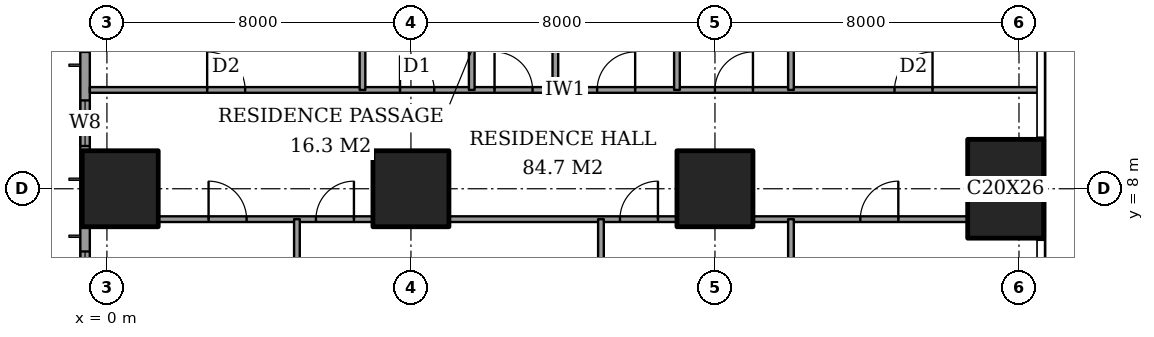
"""IFC4 building model, lengths in metres.
Left out: names, types, materials, properties, quantities, classifications, styles, units other than length and angle.
Written with IfcOpenShell. Run it as: python <this file> out.ifc"""

import sys

from ifc_helpers import new_model, si_unit, direction, frame, frame_2d, origin, origin_2d, place, context, subcontext, project, spatial, rectangle, extrude, element, fill, save


model = new_model("IFC4")
c1 = context("Model", 3, precision=1e-05, world=origin(), true_north=direction((0.0, 1.0)))
c2 = subcontext(c1, "Body", "Model", "MODEL_VIEW")
j1 = project(units=[si_unit("LENGTHUNIT", "METRE"), si_unit("PLANEANGLEUNIT", "RADIAN")], contexts=[c1])
p1 = place(None, origin())
s1 = spatial("IfcSite", under=j1, at=p1, CompositionType="ELEMENT")
p2 = place(p1, origin())
s2 = spatial("IfcBuilding", under=s1, at=p2, CompositionType="ELEMENT")
p3 = place(p2, frame((0.0, 0.0, 58.4)))
s3 = spatial("IfcBuildingStorey", under=s2, at=p3, CompositionType="ELEMENT", Elevation=58.4)
for number, where, z_axis, x_axis in (
    (1, (0.35, 8.0, 0.0), (0.0, 0.0, 1.0), (1.0, 0.0, 0.0)),
    (2, (8.0, 8.0, 0.0), (0.0, 0.0, 1.0), (1.0, 0.0, 0.0)),
    (3, (16.0, 8.0, 0.0), (0.0, 0.0, 1.0), (1.0, 0.0, 0.0)),
):
    element("IfcColumn", number, at=place(p3, frame(where, z_axis=z_axis, x_axis=x_axis)), inside=s3, PredefinedType="COLUMN", context=c2, shape_type="SweptSolid", body=[
        extrude(rectangle(XDim=2.0, YDim=2.0, at=origin_2d()), origin(), (0.0, 0.0, 1.0), 3.6),
    ])
p4 = place(p3, frame((23.65, 8.0, 0.0), z_axis=(0.0, 0.0, 1.0), x_axis=(1.0, 0.0, 0.0)))
e4 = element("IfcColumn", 4, at=p4, inside=s3, PredefinedType="COLUMN", context=c2, shape_type="SweptSolid", body=[
    extrude(rectangle(XDim=2.0, YDim=2.6, at=origin_2d()), origin(), (0.0, 0.0, 1.0), 3.6),
])
p5 = place(p3, frame((-0.575, 44.825, 0.0), z_axis=(0.0, 0.0, 1.0), x_axis=(0.0, -1.0, 0.0)))
e5 = element("IfcWall", 5, at=p5, inside=s3, PredefinedType="SOLIDWALL", context=c2, shape_type="SweptSolid", body=[
    extrude(rectangle(XDim=41.65, YDim=0.25, at=frame_2d((20.825, 0.0))), origin(), (0.0, 0.0, 1.0), 3.6),
])
p6 = place(p5, frame((0.775, 0.0, 0.6)))
e6 = element("IfcOpeningElement", 6, at=p6, cuts=e5, PredefinedType="OPENING", context=c2, shape_type="SweptSolid", body=[
    extrude(rectangle(XDim=2.4, YDim=2.0, at=frame_2d((1.2, 1.0))), frame((0.0, 0.135, 0.0), z_axis=(0.0, -1.0, 0.0), x_axis=(1.0, 0.0, 0.0)), (0.0, 0.0, 1.0), 0.27),
])
p7 = place(p5, frame((6.1, 0.0, 0.6)))
e7 = element("IfcOpeningElement", 7, at=p7, cuts=e5, PredefinedType="OPENING", context=c2, shape_type="SweptSolid", body=[
    extrude(rectangle(XDim=1.2, YDim=2.0, at=frame_2d((0.6, 1.0))), frame((0.0, 0.135, 0.0), z_axis=(0.0, -1.0, 0.0), x_axis=(1.0, 0.0, 0.0)), (0.0, 0.0, 1.0), 0.27),
])
p8 = place(p5, frame((8.425, 0.0, 0.6)))
e8 = element("IfcOpeningElement", 8, at=p8, cuts=e5, PredefinedType="OPENING", context=c2, shape_type="SweptSolid", body=[
    extrude(rectangle(XDim=2.4, YDim=2.0, at=frame_2d((1.2, 1.0))), frame((0.0, 0.135, 0.0), z_axis=(0.0, -1.0, 0.0), x_axis=(1.0, 0.0, 0.0)), (0.0, 0.0, 1.0), 0.27),
])
p9 = place(p5, frame((15.625, 0.0, 0.6)))
e9 = element("IfcOpeningElement", 9, at=p9, cuts=e5, PredefinedType="OPENING", context=c2, shape_type="SweptSolid", body=[
    extrude(rectangle(XDim=2.4, YDim=2.0, at=frame_2d((1.2, 1.0))), frame((0.0, 0.135, 0.0), z_axis=(0.0, -1.0, 0.0), x_axis=(1.0, 0.0, 0.0)), (0.0, 0.0, 1.0), 0.27),
])
p10 = place(p5, frame((23.625, 0.0, 0.6)))
e10 = element("IfcOpeningElement", 10, at=p10, cuts=e5, PredefinedType="OPENING", context=c2, shape_type="SweptSolid", body=[
    extrude(rectangle(XDim=2.4, YDim=2.0, at=frame_2d((1.2, 1.0))), frame((0.0, 0.135, 0.0), z_axis=(0.0, -1.0, 0.0), x_axis=(1.0, 0.0, 0.0)), (0.0, 0.0, 1.0), 0.27),
])
p11 = place(p5, frame((30.825, 0.0, 0.6)))
e11 = element("IfcOpeningElement", 11, at=p11, cuts=e5, PredefinedType="OPENING", context=c2, shape_type="SweptSolid", body=[
    extrude(rectangle(XDim=2.4, YDim=2.0, at=frame_2d((1.2, 1.0))), frame((0.0, 0.135, 0.0), z_axis=(0.0, -1.0, 0.0), x_axis=(1.0, 0.0, 0.0)), (0.0, 0.0, 1.0), 0.27),
])
p12 = place(p5, frame((34.5, 0.0, 0.6)))
e12 = element("IfcOpeningElement", 12, at=p12, cuts=e5, PredefinedType="OPENING", context=c2, shape_type="SweptSolid", body=[
    extrude(rectangle(XDim=1.2, YDim=2.0, at=frame_2d((0.6, 1.0))), frame((0.0, 0.135, 0.0), z_axis=(0.0, -1.0, 0.0), x_axis=(1.0, 0.0, 0.0)), (0.0, 0.0, 1.0), 0.27),
])
p13 = place(p5, frame((38.475, 0.0, 0.6)))
e13 = element("IfcOpeningElement", 13, at=p13, cuts=e5, PredefinedType="OPENING", context=c2, shape_type="SweptSolid", body=[
    extrude(rectangle(XDim=2.4, YDim=2.0, at=frame_2d((1.2, 1.0))), frame((0.0, 0.135, 0.0), z_axis=(0.0, -1.0, 0.0), x_axis=(1.0, 0.0, 0.0)), (0.0, 0.0, 1.0), 0.27),
])
p14 = place(p3, frame((1.35, 7.2, 0.0), z_axis=(0.0, 0.0, 1.0), x_axis=(1.0, 0.0, 0.0)))
e14 = element("IfcWall", 14, at=p14, inside=s3, PredefinedType="PARTITIONING", context=c2, shape_type="SweptSolid", body=[
    extrude(rectangle(XDim=5.65, YDim=0.15, at=frame_2d((2.825, 0.0))), origin(), (0.0, 0.0, 1.0), 3.35),
])
p15 = place(p14, frame((1.325, 0.0, 0.0)))
e15 = element("IfcOpeningElement", 15, at=p15, cuts=e14, PredefinedType="OPENING", context=c2, shape_type="SweptSolid", body=[
    extrude(rectangle(XDim=1.0, YDim=2.1, at=frame_2d((0.5, 1.05))), frame((0.0, 0.085, 0.0), z_axis=(0.0, -1.0, 0.0), x_axis=(1.0, 0.0, 0.0)), (0.0, 0.0, 1.0), 0.17),
])
p16 = place(p14, frame((4.15, 0.0, 0.0)))
e16 = element("IfcOpeningElement", 16, at=p16, cuts=e14, PredefinedType="OPENING", context=c2, shape_type="SweptSolid", body=[
    extrude(rectangle(XDim=1.0, YDim=2.1, at=frame_2d((0.5, 1.05))), frame((0.0, 0.085, 0.0), z_axis=(0.0, -1.0, 0.0), x_axis=(1.0, 0.0, 0.0)), (0.0, 0.0, 1.0), 0.17),
])
p17 = place(p3, frame((9.0, 7.2, 0.0), z_axis=(0.0, 0.0, 1.0), x_axis=(1.0, 0.0, 0.0)))
e17 = element("IfcWall", 17, at=p17, inside=s3, PredefinedType="PARTITIONING", context=c2, shape_type="SweptSolid", body=[
    extrude(rectangle(XDim=6.0, YDim=0.15, at=frame_2d((3.0, 0.0))), origin(), (0.0, 0.0, 1.0), 3.35),
])
p18 = place(p17, frame((4.5, 0.0, 0.0)))
e18 = element("IfcOpeningElement", 18, at=p18, cuts=e17, PredefinedType="OPENING", context=c2, shape_type="SweptSolid", body=[
    extrude(rectangle(XDim=1.0, YDim=2.1, at=frame_2d((0.5, 1.05))), frame((0.0, 0.085, 0.0), z_axis=(0.0, -1.0, 0.0), x_axis=(1.0, 0.0, 0.0)), (0.0, 0.0, 1.0), 0.17),
])
p19 = place(p3, frame((17.0, 7.2, 0.0), z_axis=(0.0, 0.0, 1.0), x_axis=(1.0, 0.0, 0.0)))
e19 = element("IfcWall", 19, at=p19, inside=s3, PredefinedType="PARTITIONING", context=c2, shape_type="SweptSolid", body=[
    extrude(rectangle(XDim=5.65, YDim=0.15, at=frame_2d((2.825, 0.0))), origin(), (0.0, 0.0, 1.0), 3.35),
])
p20 = place(p19, frame((2.825, 0.0, 0.0)))
e20 = element("IfcOpeningElement", 20, at=p20, cuts=e19, PredefinedType="OPENING", context=c2, shape_type="SweptSolid", body=[
    extrude(rectangle(XDim=1.0, YDim=2.1, at=frame_2d((0.5, 1.05))), frame((0.0, 0.085, 0.0), z_axis=(0.0, -1.0, 0.0), x_axis=(1.0, 0.0, 0.0)), (0.0, 0.0, 1.0), 0.17),
])
p21 = place(p3, frame((-0.45, 10.6, 0.0), z_axis=(0.0, 0.0, 1.0), x_axis=(1.0, 0.0, 0.0)))
e21 = element("IfcWall", 21, at=p21, inside=s3, PredefinedType="PARTITIONING", context=c2, shape_type="SweptSolid", body=[
    extrude(rectangle(XDim=25.011, YDim=0.15, at=frame_2d((12.505, 0.0))), origin(), (0.0, 0.0, 1.0), 3.35),
])
p22 = place(p21, frame((10.65, 0.0, 0.0)))
e22 = element("IfcOpeningElement", 22, at=p22, cuts=e21, PredefinedType="OPENING", context=c2, shape_type="SweptSolid", body=[
    extrude(rectangle(XDim=1.0, YDim=2.1, at=frame_2d((0.5, 1.05))), frame((0.0, 0.085, 0.0), z_axis=(0.0, -1.0, 0.0), x_axis=(1.0, 0.0, 0.0)), (0.0, 0.0, 1.0), 0.17),
])
p23 = place(p21, frame((3.087, 0.0, 0.0)))
e23 = element("IfcOpeningElement", 23, at=p23, cuts=e21, PredefinedType="OPENING", context=c2, shape_type="SweptSolid", body=[
    extrude(rectangle(XDim=1.0, YDim=2.1, at=frame_2d((0.5, 1.05))), frame((0.0, 0.085, 0.0), z_axis=(0.0, -1.0, 0.0), x_axis=(1.0, 0.0, 0.0)), (0.0, 0.0, 1.0), 0.17),
])
p24 = place(p21, frame((8.163, 0.0, 0.0)))
e24 = element("IfcOpeningElement", 24, at=p24, cuts=e21, PredefinedType="OPENING", context=c2, shape_type="SweptSolid", body=[
    extrude(rectangle(XDim=0.9, YDim=2.1, at=frame_2d((0.45, 1.05))), frame((0.0, 0.085, 0.0), z_axis=(0.0, -1.0, 0.0), x_axis=(1.0, 0.0, 0.0)), (0.0, 0.0, 1.0), 0.17),
])
p25 = place(p21, frame((13.35, 0.0, 0.0)))
e25 = element("IfcOpeningElement", 25, at=p25, cuts=e21, PredefinedType="OPENING", context=c2, shape_type="SweptSolid", body=[
    extrude(rectangle(XDim=1.0, YDim=2.1, at=frame_2d((0.5, 1.05))), frame((0.0, 0.085, 0.0), z_axis=(0.0, -1.0, 0.0), x_axis=(1.0, 0.0, 0.0)), (0.0, 0.0, 1.0), 0.17),
])
p26 = place(p21, frame((16.45, 0.0, 0.0)))
e26 = element("IfcOpeningElement", 26, at=p26, cuts=e21, PredefinedType="OPENING", context=c2, shape_type="SweptSolid", body=[
    extrude(rectangle(XDim=1.0, YDim=2.1, at=frame_2d((0.5, 1.05))), frame((0.0, 0.085, 0.0), z_axis=(0.0, -1.0, 0.0), x_axis=(1.0, 0.0, 0.0)), (0.0, 0.0, 1.0), 0.17),
])
p27 = place(p21, frame((21.175, 0.0, 0.0)))
e27 = element("IfcOpeningElement", 27, at=p27, cuts=e21, PredefinedType="OPENING", context=c2, shape_type="SweptSolid", body=[
    extrude(rectangle(XDim=1.0, YDim=2.1, at=frame_2d((0.5, 1.05))), frame((0.0, 0.085, 0.0), z_axis=(0.0, -1.0, 0.0), x_axis=(1.0, 0.0, 0.0)), (0.0, 0.0, 1.0), 0.17),
])
p28 = place(p3, frame((5.0, -0.45, 0.0), z_axis=(0.0, 0.0, 1.0), x_axis=(0.0, 1.0, 0.0)))
e28 = element("IfcWall", 28, at=p28, inside=s3, PredefinedType="PARTITIONING", context=c2, shape_type="SweptSolid", body=[
    extrude(rectangle(XDim=7.65, YDim=0.15, at=frame_2d((3.825, 0.0))), origin(), (0.0, 0.0, 1.0), 3.35),
])
p29 = place(p3, frame((6.725, 10.6, 0.0), z_axis=(0.0, 0.0, 1.0), x_axis=(0.0, 1.0, 0.0)))
e29 = element("IfcWall", 29, at=p29, inside=s3, PredefinedType="PARTITIONING", context=c2, shape_type="SweptSolid", body=[
    extrude(rectangle(XDim=4.2, YDim=0.15, at=frame_2d((2.1, 0.0))), origin(), (0.0, 0.0, 1.0), 3.35),
])
p30 = place(p3, frame((9.6, 10.6, 0.0), z_axis=(0.0, 0.0, 1.0), x_axis=(0.0, 1.0, 0.0)))
e30 = element("IfcWall", 30, at=p30, inside=s3, PredefinedType="PARTITIONING", context=c2, shape_type="SweptSolid", body=[
    extrude(rectangle(XDim=11.0, YDim=0.15, at=frame_2d((5.5, 0.0))), origin(), (0.0, 0.0, 1.0), 3.35),
])
p31 = place(p30, frame((8.7, 0.0, 0.0)))
e31 = element("IfcOpeningElement", 31, at=p31, cuts=e30, PredefinedType="OPENING", context=c2, shape_type="SweptSolid", body=[
    extrude(rectangle(XDim=1.0, YDim=2.1, at=frame_2d((0.5, 1.05))), frame((0.0, 0.085, 0.0), z_axis=(0.0, -1.0, 0.0), x_axis=(1.0, 0.0, 0.0)), (0.0, 0.0, 1.0), 0.17),
])
p32 = place(p3, frame((11.8, 10.6, 0.0), z_axis=(0.0, 0.0, 1.0), x_axis=(0.0, 1.0, 0.0)))
e32 = element("IfcWall", 32, at=p32, inside=s3, PredefinedType="PARTITIONING", context=c2, shape_type="SweptSolid", body=[
    extrude(rectangle(XDim=7.4, YDim=0.15, at=frame_2d((3.7, 0.0))), origin(), (0.0, 0.0, 1.0), 3.35),
])
p33 = place(p3, frame((13.0, -0.45, 0.0), z_axis=(0.0, 0.0, 1.0), x_axis=(0.0, 1.0, 0.0)))
e33 = element("IfcWall", 33, at=p33, inside=s3, PredefinedType="PARTITIONING", context=c2, shape_type="SweptSolid", body=[
    extrude(rectangle(XDim=7.65, YDim=0.15, at=frame_2d((3.825, 0.0))), origin(), (0.0, 0.0, 1.0), 3.35),
])
p34 = place(p3, frame((15.0, 10.6, 0.0), z_axis=(0.0, 0.0, 1.0), x_axis=(0.0, 1.0, 0.0)))
e34 = element("IfcWall", 34, at=p34, inside=s3, PredefinedType="PARTITIONING", context=c2, shape_type="SweptSolid", body=[
    extrude(rectangle(XDim=4.2, YDim=0.15, at=frame_2d((2.1, 0.0))), origin(), (0.0, 0.0, 1.0), 3.35),
])
p35 = place(p3, frame((18.0, -0.45, 0.0), z_axis=(0.0, 0.0, 1.0), x_axis=(0.0, 1.0, 0.0)))
e35 = element("IfcWall", 35, at=p35, inside=s3, PredefinedType="PARTITIONING", context=c2, shape_type="SweptSolid", body=[
    extrude(rectangle(XDim=7.65, YDim=0.15, at=frame_2d((3.825, 0.0))), origin(), (0.0, 0.0, 1.0), 3.35),
])
p36 = place(p3, frame((18.0, 10.6, 0.0), z_axis=(0.0, 0.0, 1.0), x_axis=(0.0, 1.0, 0.0)))
e36 = element("IfcWall", 36, at=p36, inside=s3, PredefinedType="PARTITIONING", context=c2, shape_type="SweptSolid", body=[
    extrude(rectangle(XDim=7.4, YDim=0.15, at=frame_2d((3.7, 0.0))), origin(), (0.0, 0.0, 1.0), 3.35),
])
p37 = place(p12, origin())
e37 = element("IfcWindow", 37, at=p37, inside=s3, PartitioningType="SINGLE_PANEL", PredefinedType="WINDOW", context=c2, shape_type="SweptSolid", body=[
    extrude(rectangle(XDim=1.2, YDim=2.0, at=frame_2d((0.6, 1.0))), frame((0.0, 0.03, 0.0), z_axis=(0.0, -1.0, 0.0), x_axis=(1.0, 0.0, 0.0)), (0.0, 0.0, 1.0), 0.06),
])
fill(e12, e37)
p38 = place(p13, origin())
e38 = element("IfcWindow", 38, at=p38, inside=s3, PartitioningType="SINGLE_PANEL", PredefinedType="WINDOW", context=c2, shape_type="SweptSolid", body=[
    extrude(rectangle(XDim=2.4, YDim=2.0, at=frame_2d((1.2, 1.0))), frame((0.0, 0.03, 0.0), z_axis=(0.0, -1.0, 0.0), x_axis=(1.0, 0.0, 0.0)), (0.0, 0.0, 1.0), 0.06),
])
fill(e13, e38)
p39 = place(p15, origin())
e39 = element("IfcDoor", 39, at=p39, inside=s3, OperationType="SINGLE_SWING_RIGHT", PredefinedType="DOOR", context=c2, shape_type="SweptSolid", body=[
    extrude(rectangle(XDim=1.0, YDim=2.1, at=frame_2d((0.5, 1.05))), frame((0.0, 0.025, 0.0), z_axis=(0.0, -1.0, 0.0), x_axis=(1.0, 0.0, 0.0)), (0.0, 0.0, 1.0), 0.05),
])
fill(e15, e39)
p40 = place(p16, origin())
e40 = element("IfcDoor", 40, at=p40, inside=s3, OperationType="SINGLE_SWING_LEFT", PredefinedType="DOOR", context=c2, shape_type="SweptSolid", body=[
    extrude(rectangle(XDim=1.0, YDim=2.1, at=frame_2d((0.5, 1.05))), frame((0.0, 0.025, 0.0), z_axis=(0.0, -1.0, 0.0), x_axis=(1.0, 0.0, 0.0)), (0.0, 0.0, 1.0), 0.05),
])
fill(e16, e40)
p41 = place(p18, origin())
e41 = element("IfcDoor", 41, at=p41, inside=s3, OperationType="SINGLE_SWING_LEFT", PredefinedType="DOOR", context=c2, shape_type="SweptSolid", body=[
    extrude(rectangle(XDim=1.0, YDim=2.1, at=frame_2d((0.5, 1.05))), frame((0.0, 0.025, 0.0), z_axis=(0.0, -1.0, 0.0), x_axis=(1.0, 0.0, 0.0)), (0.0, 0.0, 1.0), 0.05),
])
fill(e18, e41)
p42 = place(p20, origin())
e42 = element("IfcDoor", 42, at=p42, inside=s3, OperationType="SINGLE_SWING_LEFT", PredefinedType="DOOR", context=c2, shape_type="SweptSolid", body=[
    extrude(rectangle(XDim=1.0, YDim=2.1, at=frame_2d((0.5, 1.05))), frame((0.0, 0.025, 0.0), z_axis=(0.0, -1.0, 0.0), x_axis=(1.0, 0.0, 0.0)), (0.0, 0.0, 1.0), 0.05),
])
fill(e20, e42)
p43 = place(p22, origin())
e43 = element("IfcDoor", 43, at=p43, inside=s3, OperationType="SINGLE_SWING_RIGHT", PredefinedType="DOOR", context=c2, shape_type="SweptSolid", body=[
    extrude(rectangle(XDim=1.0, YDim=2.1, at=frame_2d((0.5, 1.05))), frame((0.0, 0.025, 0.0), z_axis=(0.0, -1.0, 0.0), x_axis=(1.0, 0.0, 0.0)), (0.0, 0.0, 1.0), 0.05),
])
fill(e22, e43)
p44 = place(p23, origin())
e44 = element("IfcDoor", 44, at=p44, inside=s3, OperationType="SINGLE_SWING_RIGHT", PredefinedType="DOOR", context=c2, shape_type="SweptSolid", body=[
    extrude(rectangle(XDim=1.0, YDim=2.1, at=frame_2d((0.5, 1.05))), frame((0.0, 0.025, 0.0), z_axis=(0.0, -1.0, 0.0), x_axis=(1.0, 0.0, 0.0)), (0.0, 0.0, 1.0), 0.05),
])
fill(e23, e44)
p45 = place(p24, origin())
e45 = element("IfcDoor", 45, at=p45, inside=s3, OperationType="SINGLE_SWING_RIGHT", PredefinedType="DOOR", context=c2, shape_type="SweptSolid", body=[
    extrude(rectangle(XDim=0.9, YDim=2.1, at=frame_2d((0.45, 1.05))), frame((0.0, 0.025, 0.0), z_axis=(0.0, -1.0, 0.0), x_axis=(1.0, 0.0, 0.0)), (0.0, 0.0, 1.0), 0.05),
])
fill(e24, e45)
p46 = place(p25, origin())
e46 = element("IfcDoor", 46, at=p46, inside=s3, OperationType="SINGLE_SWING_LEFT", PredefinedType="DOOR", context=c2, shape_type="SweptSolid", body=[
    extrude(rectangle(XDim=1.0, YDim=2.1, at=frame_2d((0.5, 1.05))), frame((0.0, 0.025, 0.0), z_axis=(0.0, -1.0, 0.0), x_axis=(1.0, 0.0, 0.0)), (0.0, 0.0, 1.0), 0.05),
])
fill(e25, e46)
p47 = place(p26, origin())
e47 = element("IfcDoor", 47, at=p47, inside=s3, OperationType="SINGLE_SWING_LEFT", PredefinedType="DOOR", context=c2, shape_type="SweptSolid", body=[
    extrude(rectangle(XDim=1.0, YDim=2.1, at=frame_2d((0.5, 1.05))), frame((0.0, 0.025, 0.0), z_axis=(0.0, -1.0, 0.0), x_axis=(1.0, 0.0, 0.0)), (0.0, 0.0, 1.0), 0.05),
])
fill(e26, e47)
p48 = place(p27, origin())
e48 = element("IfcDoor", 48, at=p48, inside=s3, OperationType="SINGLE_SWING_LEFT", PredefinedType="DOOR", context=c2, shape_type="SweptSolid", body=[
    extrude(rectangle(XDim=1.0, YDim=2.1, at=frame_2d((0.5, 1.05))), frame((0.0, 0.025, 0.0), z_axis=(0.0, -1.0, 0.0), x_axis=(1.0, 0.0, 0.0)), (0.0, 0.0, 1.0), 0.05),
])
fill(e27, e48)
save(model, sys.argv[1])
